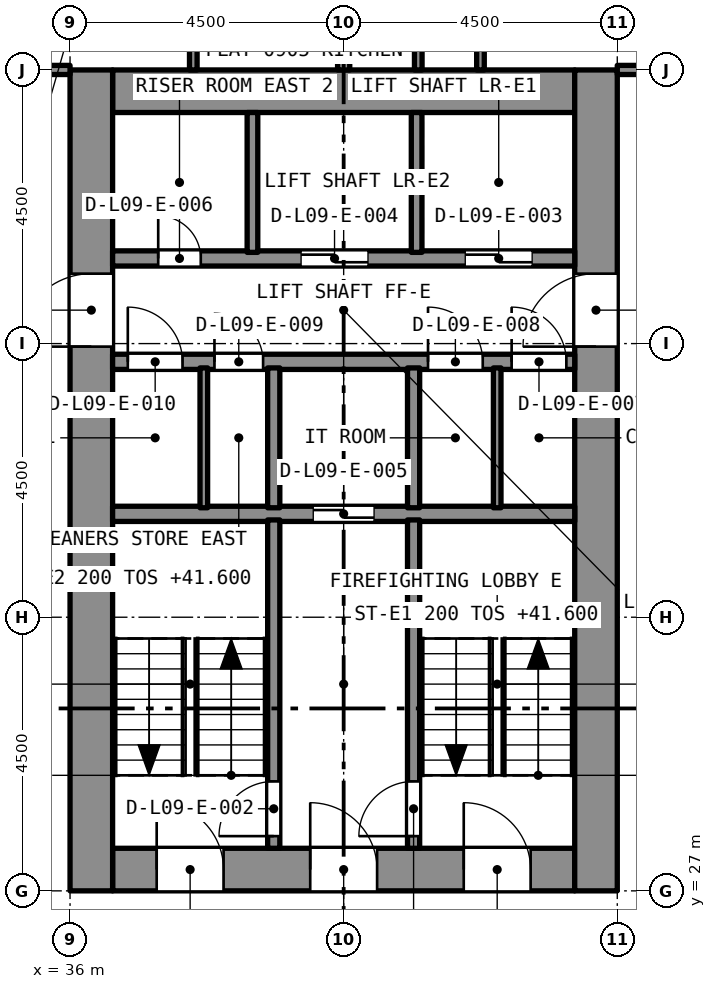
"""IFC4 building model, lengths in metres.
Left out: names, types, materials, properties, quantities, classifications, styles, units other than length and angle.
Written with IfcOpenShell. Run it as: python <this file> out.ifc"""

import sys

from ifc_helpers import new_model, si_unit, direction, frame, frame_2d, origin, place, context, subcontext, project, spatial, rectangle, extrude, element, fill, save


model = new_model("IFC4")
c1 = context("Model", 3, precision=1e-05, world=origin(), true_north=direction((0.0, 1.0)))
c2 = subcontext(c1, "Body", "Model", "MODEL_VIEW")
j1 = project(units=[si_unit("LENGTHUNIT", "METRE"), si_unit("PLANEANGLEUNIT", "RADIAN")], contexts=[c1])
p1 = place(None, origin())
s1 = spatial("IfcSite", under=j1, at=p1, CompositionType="ELEMENT")
p2 = place(p1, origin())
s2 = spatial("IfcBuilding", under=s1, at=p2, CompositionType="ELEMENT")
p3 = place(p2, frame((0.0, 0.0, 40.0)))
s3 = spatial("IfcBuildingStorey", under=s2, at=p3, CompositionType="ELEMENT", Elevation=40.0)
p4 = place(p3, frame((36.7, 27.35, 0.0), z_axis=(0.0, 0.0, 1.0), x_axis=(1.0, 0.0, 0.0)))
e1 = element("IfcWall", 1, at=p4, inside=s3, PredefinedType="SOLIDWALL", context=c2, shape_type="SweptSolid", body=[
    extrude(rectangle(XDim=7.6, YDim=0.7, at=frame_2d((3.8, 0.0))), origin(), (0.0, 0.0, 1.0), 3.2),
])
p5 = place(p4, frame((5.775, 0.0, 0.0)))
e2 = element("IfcOpeningElement", 2, at=p5, cuts=e1, PredefinedType="OPENING", context=c2, shape_type="SweptSolid", body=[
    extrude(rectangle(XDim=1.1, YDim=2.1, at=frame_2d((0.55, 1.05))), frame((0.0, 0.36, 0.0), z_axis=(0.0, -1.0, 0.0), x_axis=(1.0, 0.0, 0.0)), (0.0, 0.0, 1.0), 0.72),
])
p6 = place(p4, frame((3.25, 0.0, 0.0)))
e3 = element("IfcOpeningElement", 3, at=p6, cuts=e1, PredefinedType="OPENING", context=c2, shape_type="SweptSolid", body=[
    extrude(rectangle(XDim=1.1, YDim=2.1, at=frame_2d((0.55, 1.05))), frame((0.0, 0.36, 0.0), z_axis=(0.0, -1.0, 0.0), x_axis=(1.0, 0.0, 0.0)), (0.0, 0.0, 1.0), 0.72),
])
p7 = place(p4, frame((0.725, 0.0, 0.0)))
e4 = element("IfcOpeningElement", 4, at=p7, cuts=e1, PredefinedType="OPENING", context=c2, shape_type="SweptSolid", body=[
    extrude(rectangle(XDim=1.1, YDim=2.1, at=frame_2d((0.55, 1.05))), frame((0.0, 0.36, 0.0), z_axis=(0.0, -1.0, 0.0), x_axis=(1.0, 0.0, 0.0)), (0.0, 0.0, 1.0), 0.72),
])
p8 = place(p3, frame((36.7, 40.15, 0.0), z_axis=(0.0, 0.0, 1.0), x_axis=(1.0, 0.0, 0.0)))
e5 = element("IfcWall", 5, at=p8, inside=s3, PredefinedType="SOLIDWALL", context=c2, shape_type="SweptSolid", body=[
    extrude(rectangle(XDim=7.6, YDim=0.7, at=frame_2d((3.8, 0.0))), origin(), (0.0, 0.0, 1.0), 3.2),
])
p9 = place(p3, frame((36.35, 27.0, 0.0), z_axis=(0.0, 0.0, 1.0), x_axis=(0.0, 1.0, 0.0)))
e6 = element("IfcWall", 6, at=p9, inside=s3, PredefinedType="SOLIDWALL", context=c2, shape_type="SweptSolid", body=[
    extrude(rectangle(XDim=13.5, YDim=0.7, at=frame_2d((6.75, 0.0))), origin(), (0.0, 0.0, 1.0), 3.2),
])
p10 = place(p9, frame((8.95, 0.0, 0.0)))
e7 = element("IfcOpeningElement", 7, at=p10, cuts=e6, PredefinedType="OPENING", context=c2, shape_type="SweptSolid", body=[
    extrude(rectangle(XDim=1.2, YDim=2.1, at=frame_2d((0.6, 1.05))), frame((0.0, 0.36, 0.0), z_axis=(0.0, -1.0, 0.0), x_axis=(1.0, 0.0, 0.0)), (0.0, 0.0, 1.0), 0.72),
])
p11 = place(p3, frame((44.65, 27.0, 0.0), z_axis=(0.0, 0.0, 1.0), x_axis=(0.0, 1.0, 0.0)))
e8 = element("IfcWall", 8, at=p11, inside=s3, PredefinedType="SOLIDWALL", context=c2, shape_type="SweptSolid", body=[
    extrude(rectangle(XDim=13.5, YDim=0.7, at=frame_2d((6.75, 0.0))), origin(), (0.0, 0.0, 1.0), 3.2),
])
p12 = place(p11, frame((8.95, 0.0, 0.0)))
e9 = element("IfcOpeningElement", 9, at=p12, cuts=e8, PredefinedType="OPENING", context=c2, shape_type="SweptSolid", body=[
    extrude(rectangle(XDim=1.2, YDim=2.1, at=frame_2d((0.6, 1.05))), frame((0.0, 0.36, 0.0), z_axis=(0.0, -1.0, 0.0), x_axis=(1.0, 0.0, 0.0)), (0.0, 0.0, 1.0), 0.72),
])
p13 = place(p3, frame((42.75, 40.5, 0.0), z_axis=(0.0, 0.0, 1.0), x_axis=(0.0, 1.0, 0.0)))
e10 = element("IfcWall", 10, at=p13, inside=s3, PredefinedType="PARTITIONING", context=c2, shape_type="SweptSolid", body=[
    extrude(rectangle(XDim=3.323, YDim=0.125, at=frame_2d((1.661, 0.0))), origin(), (0.0, 0.0, 1.0), 2.9),
])
p14 = place(p13, frame((2.34, 0.0, 0.0)))
e11 = element("IfcOpeningElement", 11, at=p14, cuts=e10, PredefinedType="OPENING", context=c2, shape_type="SweptSolid", body=[
    extrude(rectangle(XDim=0.8, YDim=2.1, at=frame_2d((0.4, 1.05))), frame((0.0, 0.073, 0.0), z_axis=(0.0, -1.0, 0.0), x_axis=(1.0, 0.0, 0.0)), (0.0, 0.0, 1.0), 0.145),
])
p15 = place(p3, frame((41.727, 40.5, 0.0), z_axis=(0.0, 0.0, 1.0), x_axis=(0.0, 1.0, 0.0)))
e12 = element("IfcWall", 12, at=p15, inside=s3, PredefinedType="PARTITIONING", context=c2, shape_type="SweptSolid", body=[
    extrude(rectangle(XDim=3.198, YDim=0.125, at=frame_2d((1.599, 0.0))), origin(), (0.0, 0.0, 1.0), 2.9),
])
p16 = place(p3, frame((45.0, 40.5, 0.0), z_axis=(0.0, 0.0, 1.0), x_axis=(1.0, 0.0, 0.0)))
e13 = element("IfcWall", 13, at=p16, inside=s3, PredefinedType="PARTITIONING", context=c2, shape_type="SweptSolid", body=[
    extrude(rectangle(XDim=3.8, YDim=0.15, at=frame_2d((1.9, 0.0))), origin(), (0.0, 0.0, 1.0), 2.9),
])
p17 = place(p16, frame((1.75, 0.0, 0.0)))
e14 = element("IfcOpeningElement", 14, at=p17, cuts=e13, PredefinedType="OPENING", context=c2, shape_type="SweptSolid", body=[
    extrude(rectangle(XDim=1.0, YDim=2.1, at=frame_2d((0.5, 1.05))), frame((0.0, 0.085, 0.0), z_axis=(0.0, -1.0, 0.0), x_axis=(1.0, 0.0, 0.0)), (0.0, 0.0, 1.0), 0.17),
])
p18 = place(p3, frame((40.5, 40.5, 0.0), z_axis=(0.0, 0.0, 1.0), x_axis=(0.0, 1.0, 0.0)))
e15 = element("IfcWall", 15, at=p18, inside=s3, PredefinedType="PARTITIONING", context=c2, shape_type="SweptSolid", body=[
    extrude(rectangle(XDim=3.173, YDim=0.2, at=frame_2d((1.586, 0.0))), origin(), (0.0, 0.0, 1.0), 2.9),
])
p19 = place(p3, frame((38.027, 40.5, 0.0), z_axis=(0.0, 0.0, 1.0), x_axis=(0.0, 1.0, 0.0)))
e16 = element("IfcWall", 16, at=p19, inside=s3, PredefinedType="PARTITIONING", context=c2, shape_type="SweptSolid", body=[
    extrude(rectangle(XDim=3.048, YDim=0.125, at=frame_2d((1.524, 0.0))), origin(), (0.0, 0.0, 1.0), 2.9),
])
p20 = place(p3, frame((34.5, 40.5, 0.0), z_axis=(0.0, 0.0, 1.0), x_axis=(1.0, 0.0, 0.0)))
e17 = element("IfcWall", 17, at=p20, inside=s3, PredefinedType="PARTITIONING", context=c2, shape_type="SweptSolid", body=[
    extrude(rectangle(XDim=1.5, YDim=0.15, at=frame_2d((0.75, 0.0))), origin(), (0.0, 0.0, 1.0), 2.9),
])
p21 = place(p3, frame((36.7, 33.2, 0.0), z_axis=(0.0, 0.0, 1.0), x_axis=(1.0, 0.0, 0.0)))
e18 = element("IfcWall", 18, at=p21, inside=s3, PredefinedType="SOLIDWALL", context=c2, shape_type="SweptSolid", body=[
    extrude(rectangle(XDim=7.6, YDim=0.25, at=frame_2d((3.8, 0.0))), origin(), (0.0, 0.0, 1.0), 2.9),
])
p22 = place(p21, frame((3.3, 0.0, 0.0)))
e19 = element("IfcOpeningElement", 19, at=p22, cuts=e18, PredefinedType="OPENING", context=c2, shape_type="SweptSolid", body=[
    extrude(rectangle(XDim=1.0, YDim=2.1, at=frame_2d((0.5, 1.05))), frame((0.0, 0.135, 0.0), z_axis=(0.0, -1.0, 0.0), x_axis=(1.0, 0.0, 0.0)), (0.0, 0.0, 1.0), 0.27),
])
p23 = place(p3, frame((36.7, 35.7, 0.0), z_axis=(0.0, 0.0, 1.0), x_axis=(1.0, 0.0, 0.0)))
e20 = element("IfcWall", 20, at=p23, inside=s3, PredefinedType="SOLIDWALL", context=c2, shape_type="SweptSolid", body=[
    extrude(rectangle(XDim=7.6, YDim=0.25, at=frame_2d((3.8, 0.0))), origin(), (0.0, 0.0, 1.0), 2.9),
])
p24 = place(p23, frame((6.562, 0.0, 0.0)))
e21 = element("IfcOpeningElement", 21, at=p24, cuts=e20, PredefinedType="OPENING", context=c2, shape_type="SweptSolid", body=[
    extrude(rectangle(XDim=0.9, YDim=2.1, at=frame_2d((0.45, 1.05))), frame((0.0, 0.135, 0.0), z_axis=(0.0, -1.0, 0.0), x_axis=(1.0, 0.0, 0.0)), (0.0, 0.0, 1.0), 0.27),
])
p25 = place(p23, frame((5.188, 0.0, 0.0)))
e22 = element("IfcOpeningElement", 22, at=p25, cuts=e20, PredefinedType="OPENING", context=c2, shape_type="SweptSolid", body=[
    extrude(rectangle(XDim=0.9, YDim=2.1, at=frame_2d((0.45, 1.05))), frame((0.0, 0.135, 0.0), z_axis=(0.0, -1.0, 0.0), x_axis=(1.0, 0.0, 0.0)), (0.0, 0.0, 1.0), 0.27),
])
p26 = place(p23, frame((1.675, 0.0, 0.0)))
e23 = element("IfcOpeningElement", 23, at=p26, cuts=e20, PredefinedType="OPENING", context=c2, shape_type="SweptSolid", body=[
    extrude(rectangle(XDim=0.8, YDim=2.1, at=frame_2d((0.4, 1.05))), frame((0.0, 0.135, 0.0), z_axis=(0.0, -1.0, 0.0), x_axis=(1.0, 0.0, 0.0)), (0.0, 0.0, 1.0), 0.27),
])
p27 = place(p23, frame((0.25, 0.0, 0.0)))
e24 = element("IfcOpeningElement", 24, at=p27, cuts=e20, PredefinedType="OPENING", context=c2, shape_type="SweptSolid", body=[
    extrude(rectangle(XDim=0.9, YDim=2.1, at=frame_2d((0.45, 1.05))), frame((0.0, 0.135, 0.0), z_axis=(0.0, -1.0, 0.0), x_axis=(1.0, 0.0, 0.0)), (0.0, 0.0, 1.0), 0.27),
])
p28 = place(p3, frame((36.7, 37.4, 0.0), z_axis=(0.0, 0.0, 1.0), x_axis=(1.0, 0.0, 0.0)))
e25 = element("IfcWall", 25, at=p28, inside=s3, PredefinedType="SOLIDWALL", context=c2, shape_type="SweptSolid", body=[
    extrude(rectangle(XDim=7.6, YDim=0.25, at=frame_2d((3.8, 0.0))), origin(), (0.0, 0.0, 1.0), 2.9),
])
p29 = place(p28, frame((5.8, 0.0, 0.0)))
e26 = element("IfcOpeningElement", 26, at=p29, cuts=e25, PredefinedType="OPENING", context=c2, shape_type="SweptSolid", body=[
    extrude(rectangle(XDim=1.1, YDim=2.4, at=frame_2d((0.55, 1.2))), frame((0.0, 0.135, 0.0), z_axis=(0.0, -1.0, 0.0), x_axis=(1.0, 0.0, 0.0)), (0.0, 0.0, 1.0), 0.27),
])
p30 = place(p28, frame((3.1, 0.0, 0.0)))
e27 = element("IfcOpeningElement", 27, at=p30, cuts=e25, PredefinedType="OPENING", context=c2, shape_type="SweptSolid", body=[
    extrude(rectangle(XDim=1.1, YDim=2.4, at=frame_2d((0.55, 1.2))), frame((0.0, 0.135, 0.0), z_axis=(0.0, -1.0, 0.0), x_axis=(1.0, 0.0, 0.0)), (0.0, 0.0, 1.0), 0.27),
])
p31 = place(p28, frame((0.75, 0.0, 0.0)))
e28 = element("IfcOpeningElement", 28, at=p31, cuts=e25, PredefinedType="OPENING", context=c2, shape_type="SweptSolid", body=[
    extrude(rectangle(XDim=0.7, YDim=2.1, at=frame_2d((0.35, 1.05))), frame((0.0, 0.135, 0.0), z_axis=(0.0, -1.0, 0.0), x_axis=(1.0, 0.0, 0.0)), (0.0, 0.0, 1.0), 0.27),
])
p32 = place(p3, frame((41.65, 27.7, 0.0), z_axis=(0.0, 0.0, 1.0), x_axis=(0.0, 1.0, 0.0)))
e29 = element("IfcWall", 29, at=p32, inside=s3, PredefinedType="SOLIDWALL", context=c2, shape_type="SweptSolid", body=[
    extrude(rectangle(XDim=5.4, YDim=0.2, at=frame_2d((2.7, 0.0))), origin(), (0.0, 0.0, 1.0), 2.9),
])
p33 = place(p32, frame((0.2, 0.0, 0.0)))
e30 = element("IfcOpeningElement", 30, at=p33, cuts=e29, PredefinedType="OPENING", context=c2, shape_type="SweptSolid", body=[
    extrude(rectangle(XDim=0.9, YDim=2.1, at=frame_2d((0.45, 1.05))), frame((0.0, 0.11, 0.0), z_axis=(0.0, -1.0, 0.0), x_axis=(1.0, 0.0, 0.0)), (0.0, 0.0, 1.0), 0.22),
])
p34 = place(p3, frame((39.35, 27.7, 0.0), z_axis=(0.0, 0.0, 1.0), x_axis=(0.0, 1.0, 0.0)))
e31 = element("IfcWall", 31, at=p34, inside=s3, PredefinedType="SOLIDWALL", context=c2, shape_type="SweptSolid", body=[
    extrude(rectangle(XDim=5.4, YDim=0.2, at=frame_2d((2.7, 0.0))), origin(), (0.0, 0.0, 1.0), 2.9),
])
p35 = place(p34, frame((0.2, 0.0, 0.0)))
e32 = element("IfcOpeningElement", 32, at=p35, cuts=e31, PredefinedType="OPENING", context=c2, shape_type="SweptSolid", body=[
    extrude(rectangle(XDim=0.9, YDim=2.1, at=frame_2d((0.45, 1.05))), frame((0.0, 0.11, 0.0), z_axis=(0.0, -1.0, 0.0), x_axis=(1.0, 0.0, 0.0)), (0.0, 0.0, 1.0), 0.22),
])
for number, where, z_axis, x_axis in (
    (33, (41.65, 33.3, 0.0), (0.0, 0.0, 1.0), (0.0, 1.0, 0.0)),
    (34, (39.35, 33.3, 0.0), (0.0, 0.0, 1.0), (0.0, 1.0, 0.0)),
):
    element("IfcWall", number, at=place(p3, frame(where, z_axis=z_axis, x_axis=x_axis)), inside=s3, PredefinedType="SOLIDWALL", context=c2, shape_type="SweptSolid", body=[
        extrude(rectangle(XDim=2.3, YDim=0.2, at=frame_2d((1.15, 0.0))), origin(), (0.0, 0.0, 1.0), 2.9),
    ])
for number, where, z_axis, x_axis in (
    (35, (41.7, 37.5, 0.0), (0.0, 0.0, 1.0), (0.0, 1.0, 0.0)),
    (36, (39.0, 37.5, 0.0), (0.0, 0.0, 1.0), (0.0, 1.0, 0.0)),
):
    element("IfcWall", number, at=place(p3, frame(where, z_axis=z_axis, x_axis=x_axis)), inside=s3, PredefinedType="SOLIDWALL", context=c2, shape_type="SweptSolid", body=[
        extrude(rectangle(XDim=2.3, YDim=0.175, at=frame_2d((1.15, 0.0))), origin(), (0.0, 0.0, 1.0), 2.9),
    ])
for number, where, z_axis, x_axis in (
    (37, (43.025, 33.3, 0.0), (0.0, 0.0, 1.0), (0.0, 1.0, 0.0)),
    (38, (38.2, 33.3, 0.0), (0.0, 0.0, 1.0), (0.0, 1.0, 0.0)),
):
    element("IfcWall", number, at=place(p3, frame(where, z_axis=z_axis, x_axis=x_axis)), inside=s3, PredefinedType="PARTITIONING", context=c2, shape_type="SweptSolid", body=[
        extrude(rectangle(XDim=2.3, YDim=0.125, at=frame_2d((1.15, 0.0))), origin(), (0.0, 0.0, 1.0), 2.9),
    ])
p36 = place(p33, origin())
e39 = element("IfcDoor", 39, at=p36, inside=s3, OperationType="SINGLE_SWING_LEFT", PredefinedType="DOOR", context=c2, shape_type="SweptSolid", body=[
    extrude(rectangle(XDim=0.9, YDim=2.1, at=frame_2d((0.45, 1.05))), frame((0.0, 0.025, 0.0), z_axis=(0.0, -1.0, 0.0), x_axis=(1.0, 0.0, 0.0)), (0.0, 0.0, 1.0), 0.05),
])
fill(e30, e39)
p37 = place(p35, origin())
e40 = element("IfcDoor", 40, at=p37, inside=s3, OperationType="SINGLE_SWING_LEFT", PredefinedType="DOOR", context=c2, shape_type="SweptSolid", body=[
    extrude(rectangle(XDim=0.9, YDim=2.1, at=frame_2d((0.45, 1.05))), frame((0.0, 0.025, 0.0), z_axis=(0.0, -1.0, 0.0), x_axis=(1.0, 0.0, 0.0)), (0.0, 0.0, 1.0), 0.05),
])
fill(e32, e40)
p38 = place(p29, origin())
e41 = element("IfcDoor", 41, at=p38, inside=s3, OperationType="SLIDING_TO_LEFT", PredefinedType="DOOR", context=c2, shape_type="SweptSolid", body=[
    extrude(rectangle(XDim=1.1, YDim=2.4, at=frame_2d((0.55, 1.2))), frame((0.0, 0.025, 0.0), z_axis=(0.0, -1.0, 0.0), x_axis=(1.0, 0.0, 0.0)), (0.0, 0.0, 1.0), 0.05),
])
fill(e26, e41)
p39 = place(p30, origin())
e42 = element("IfcDoor", 42, at=p39, inside=s3, OperationType="SLIDING_TO_LEFT", PredefinedType="DOOR", context=c2, shape_type="SweptSolid", body=[
    extrude(rectangle(XDim=1.1, YDim=2.4, at=frame_2d((0.55, 1.2))), frame((0.0, 0.025, 0.0), z_axis=(0.0, -1.0, 0.0), x_axis=(1.0, 0.0, 0.0)), (0.0, 0.0, 1.0), 0.05),
])
fill(e27, e42)
p40 = place(p22, origin())
e43 = element("IfcDoor", 43, at=p40, inside=s3, OperationType="SLIDING_TO_LEFT", PredefinedType="DOOR", context=c2, shape_type="SweptSolid", body=[
    extrude(rectangle(XDim=1.0, YDim=2.1, at=frame_2d((0.5, 1.05))), frame((0.0, 0.025, 0.0), z_axis=(0.0, -1.0, 0.0), x_axis=(1.0, 0.0, 0.0)), (0.0, 0.0, 1.0), 0.05),
])
fill(e19, e43)
p41 = place(p31, origin())
e44 = element("IfcDoor", 44, at=p41, inside=s3, OperationType="SINGLE_SWING_LEFT", PredefinedType="DOOR", context=c2, shape_type="SweptSolid", body=[
    extrude(rectangle(XDim=0.7, YDim=2.1, at=frame_2d((0.35, 1.05))), frame((0.0, 0.025, 0.0), z_axis=(0.0, -1.0, 0.0), x_axis=(1.0, 0.0, 0.0)), (0.0, 0.0, 1.0), 0.05),
])
fill(e28, e44)
p42 = place(p24, origin())
e45 = element("IfcDoor", 45, at=p42, inside=s3, OperationType="SINGLE_SWING_LEFT", PredefinedType="DOOR", context=c2, shape_type="SweptSolid", body=[
    extrude(rectangle(XDim=0.9, YDim=2.1, at=frame_2d((0.45, 1.05))), frame((0.0, 0.025, 0.0), z_axis=(0.0, -1.0, 0.0), x_axis=(1.0, 0.0, 0.0)), (0.0, 0.0, 1.0), 0.05),
])
fill(e21, e45)
p43 = place(p25, origin())
e46 = element("IfcDoor", 46, at=p43, inside=s3, OperationType="SINGLE_SWING_LEFT", PredefinedType="DOOR", context=c2, shape_type="SweptSolid", body=[
    extrude(rectangle(XDim=0.9, YDim=2.1, at=frame_2d((0.45, 1.05))), frame((0.0, 0.025, 0.0), z_axis=(0.0, -1.0, 0.0), x_axis=(1.0, 0.0, 0.0)), (0.0, 0.0, 1.0), 0.05),
])
fill(e22, e46)
p44 = place(p26, origin())
e47 = element("IfcDoor", 47, at=p44, inside=s3, OperationType="SINGLE_SWING_LEFT", PredefinedType="DOOR", context=c2, shape_type="SweptSolid", body=[
    extrude(rectangle(XDim=0.8, YDim=2.1, at=frame_2d((0.4, 1.05))), frame((0.0, 0.025, 0.0), z_axis=(0.0, -1.0, 0.0), x_axis=(1.0, 0.0, 0.0)), (0.0, 0.0, 1.0), 0.05),
])
fill(e23, e47)
p45 = place(p27, origin())
e48 = element("IfcDoor", 48, at=p45, inside=s3, OperationType="SINGLE_SWING_LEFT", PredefinedType="DOOR", context=c2, shape_type="SweptSolid", body=[
    extrude(rectangle(XDim=0.9, YDim=2.1, at=frame_2d((0.45, 1.05))), frame((0.0, 0.025, 0.0), z_axis=(0.0, -1.0, 0.0), x_axis=(1.0, 0.0, 0.0)), (0.0, 0.0, 1.0), 0.05),
])
fill(e24, e48)
p46 = place(p5, origin())
e49 = element("IfcDoor", 49, at=p46, inside=s3, OperationType="SINGLE_SWING_LEFT", PredefinedType="DOOR", context=c2, shape_type="SweptSolid", body=[
    extrude(rectangle(XDim=1.1, YDim=2.1, at=frame_2d((0.55, 1.05))), frame((0.0, 0.025, 0.0), z_axis=(0.0, -1.0, 0.0), x_axis=(1.0, 0.0, 0.0)), (0.0, 0.0, 1.0), 0.05),
])
fill(e2, e49)
p47 = place(p6, origin())
e50 = element("IfcDoor", 50, at=p47, inside=s3, OperationType="SINGLE_SWING_LEFT", PredefinedType="DOOR", context=c2, shape_type="SweptSolid", body=[
    extrude(rectangle(XDim=1.1, YDim=2.1, at=frame_2d((0.55, 1.05))), frame((0.0, 0.025, 0.0), z_axis=(0.0, -1.0, 0.0), x_axis=(1.0, 0.0, 0.0)), (0.0, 0.0, 1.0), 0.05),
])
fill(e3, e50)
p48 = place(p7, origin())
e51 = element("IfcDoor", 51, at=p48, inside=s3, OperationType="SINGLE_SWING_LEFT", PredefinedType="DOOR", context=c2, shape_type="SweptSolid", body=[
    extrude(rectangle(XDim=1.1, YDim=2.1, at=frame_2d((0.55, 1.05))), frame((0.0, 0.025, 0.0), z_axis=(0.0, -1.0, 0.0), x_axis=(1.0, 0.0, 0.0)), (0.0, 0.0, 1.0), 0.05),
])
fill(e4, e51)
p49 = place(p10, origin())
e52 = element("IfcDoor", 52, at=p49, inside=s3, OperationType="SINGLE_SWING_LEFT", PredefinedType="DOOR", context=c2, shape_type="SweptSolid", body=[
    extrude(rectangle(XDim=1.2, YDim=2.1, at=frame_2d((0.6, 1.05))), frame((0.0, 0.025, 0.0), z_axis=(0.0, -1.0, 0.0), x_axis=(1.0, 0.0, 0.0)), (0.0, 0.0, 1.0), 0.05),
])
fill(e7, e52)
p50 = place(p12, origin())
e53 = element("IfcDoor", 53, at=p50, inside=s3, OperationType="SINGLE_SWING_LEFT", PredefinedType="DOOR", context=c2, shape_type="SweptSolid", body=[
    extrude(rectangle(XDim=1.2, YDim=2.1, at=frame_2d((0.6, 1.05))), frame((0.0, 0.025, 0.0), z_axis=(0.0, -1.0, 0.0), x_axis=(1.0, 0.0, 0.0)), (0.0, 0.0, 1.0), 0.05),
])
fill(e9, e53)
save(model, sys.argv[1])
